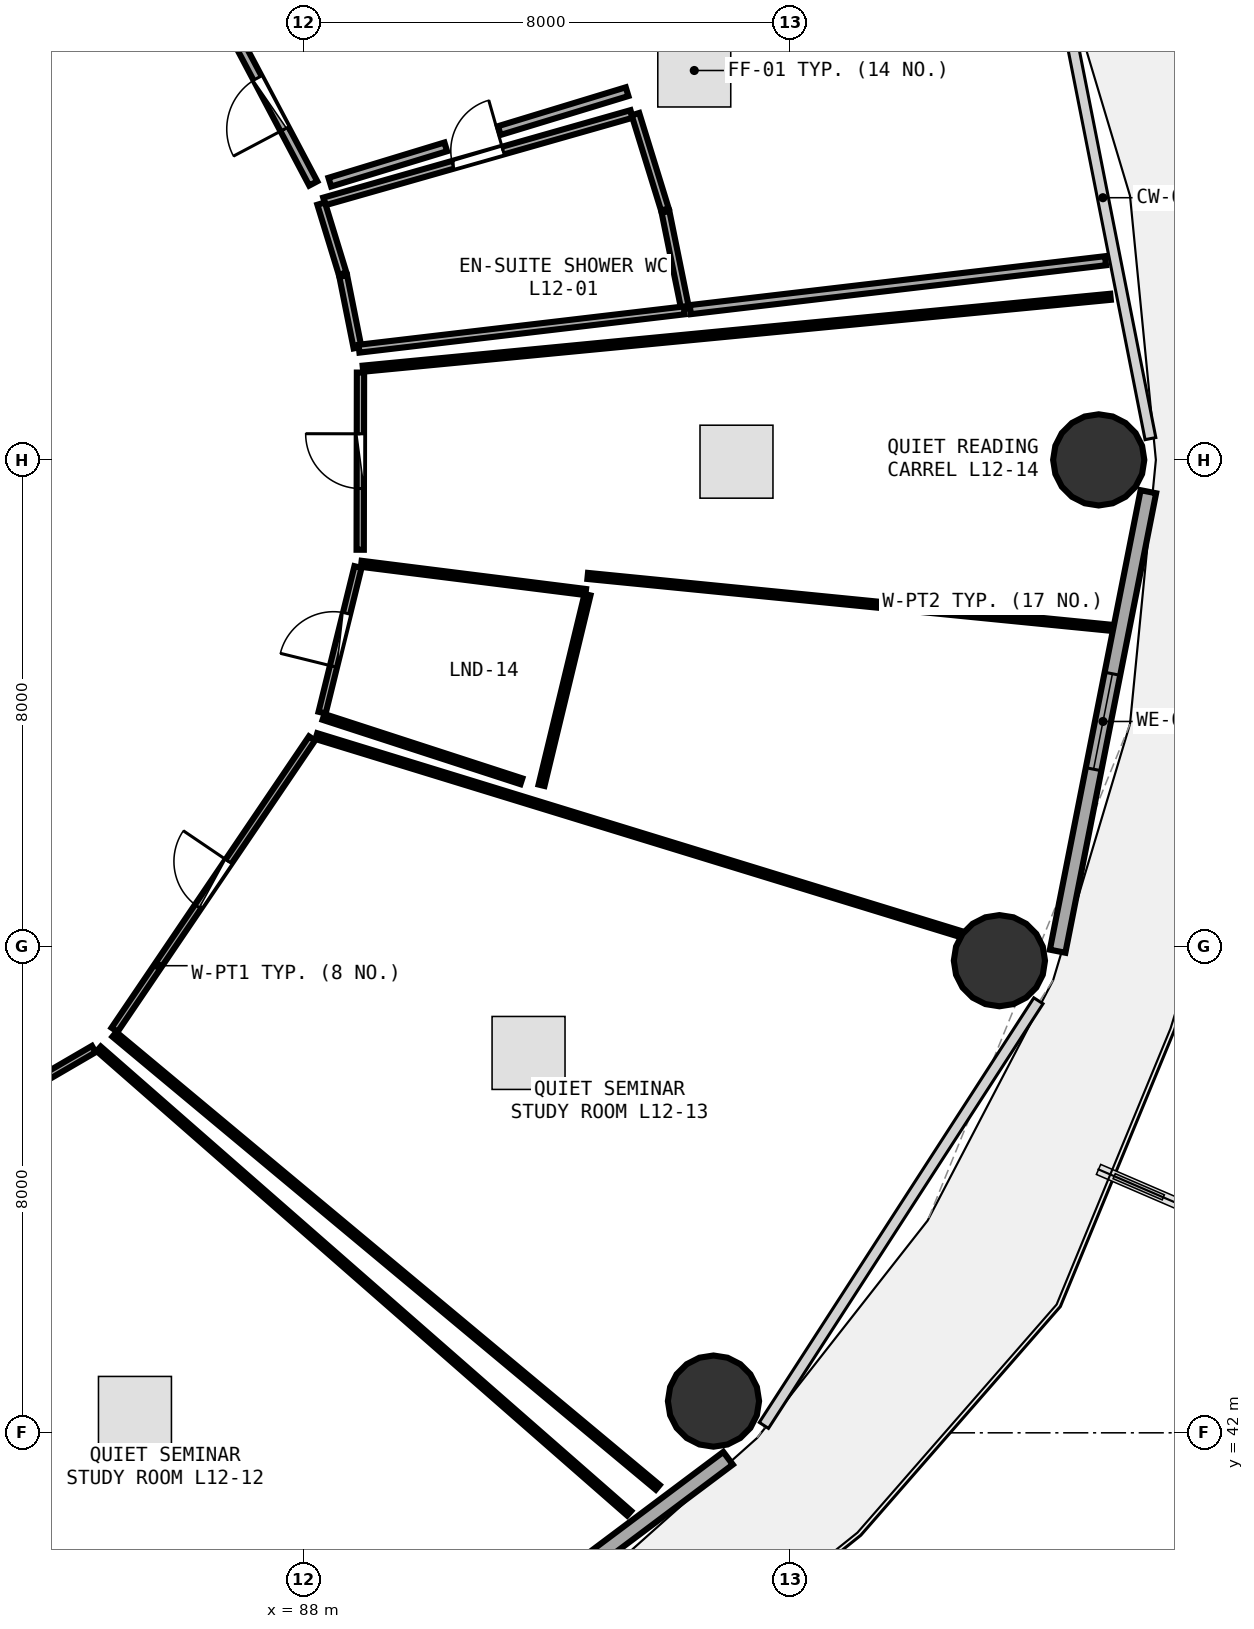
"""IFC4 building model, lengths in metres.
Left out: names, types, materials, properties, quantities, classifications, styles, units other than length and angle.
Written with IfcOpenShell. Run it as: python <this file> out.ifc"""

import sys

from ifc_helpers import new_model, si_unit, direction, frame, frame_2d, origin, origin_2d, place, context, subcontext, project, spatial, rectangle, circle, extrude, element, fill, save


model = new_model("IFC4")
c1 = context("Model", 3, precision=1e-05, world=origin(), true_north=direction((0.0, 1.0)))
c2 = subcontext(c1, "Body", "Model", "MODEL_VIEW")
j1 = project(units=[si_unit("LENGTHUNIT", "METRE"), si_unit("PLANEANGLEUNIT", "RADIAN")], contexts=[c1])
p1 = place(None, origin())
s1 = spatial("IfcSite", under=j1, at=p1, CompositionType="ELEMENT")
p2 = place(p1, origin())
s2 = spatial("IfcBuilding", under=s1, at=p2, CompositionType="ELEMENT")
p3 = place(p2, frame((0.0, 0.0, 48.75)))
s3 = spatial("IfcBuildingStorey", under=s2, at=p3, CompositionType="ELEMENT", Elevation=48.75)
for number, where, z_axis, x_axis in (
    (1, (101.08, 58.0, 0.0), (0.0, 0.0, 1.0), (1.0, 0.0, 0.0)),
    (2, (94.744, 42.522, 0.0), (0.0, 0.0, 1.0), (1.0, 0.0, 0.0)),
    (3, (99.447, 49.764, 0.0), (0.0, 0.0, 1.0), (1.0, 0.0, 0.0)),
):
    element("IfcColumn", number, at=place(p3, frame(where, z_axis=z_axis, x_axis=x_axis)), inside=s3, PredefinedType="COLUMN", context=c2, shape_type="SweptSolid", body=[
        extrude(circle(Radius=0.75, at=origin_2d()), origin(), (0.0, 0.0, 1.0), 3.75),
    ])
p4 = place(p3, frame((88.349, 36.611, 0.0), z_axis=(0.0, 0.0, 1.0), x_axis=(0.80030733173, 0.599590005569, 0.0)))
e4 = element("IfcWall", 4, at=p4, inside=s3, PredefinedType="SOLIDWALL", context=c2, shape_type="SweptSolid", body=[
    extrude(rectangle(XDim=8.291, YDim=0.26, at=frame_2d((4.145, 0.0))), origin(), (0.0, 0.0, 1.0), 3.475),
])
p5 = place(p4, frame((3.345, 0.0, 0.85)))
e5 = element("IfcOpeningElement", 5, at=p5, cuts=e4, PredefinedType="OPENING", context=c2, shape_type="SweptSolid", body=[
    extrude(rectangle(XDim=1.6, YDim=1.45, at=frame_2d((0.8, 0.725))), frame((0.0, 0.14, 0.0), z_axis=(0.0, -1.0, 0.0), x_axis=(1.0, 0.0, 0.0)), (0.0, 0.0, 1.0), 0.28),
])
p6 = place(p3, frame((100.404, 49.92, 0.0), z_axis=(0.0, 0.0, 1.0), x_axis=(0.193726159581, 0.98105564322, 0.0)))
e6 = element("IfcWall", 6, at=p6, inside=s3, PredefinedType="SOLIDWALL", context=c2, shape_type="SweptSolid", body=[
    extrude(rectangle(XDim=7.703, YDim=0.26, at=frame_2d((3.851, 0.0))), origin(), (0.0, 0.0, 1.0), 3.475),
])
p7 = place(p6, frame((3.051, 0.0, 0.85)))
e7 = element("IfcOpeningElement", 7, at=p7, cuts=e6, PredefinedType="OPENING", context=c2, shape_type="SweptSolid", body=[
    extrude(rectangle(XDim=1.6, YDim=1.45, at=frame_2d((0.8, 0.725))), frame((0.0, 0.14, 0.0), z_axis=(0.0, -1.0, 0.0), x_axis=(1.0, 0.0, 0.0)), (0.0, 0.0, 1.0), 0.28),
])
p8 = place(p3, frame((88.344, 62.25, 0.0), z_axis=(0.0, 0.0, 1.0), x_axis=(0.961805744602, 0.273732916636, 0.0)))
e8 = element("IfcWall", 8, at=p8, inside=s3, PredefinedType="PLUMBINGWALL", context=c2, shape_type="SweptSolid", body=[
    extrude(rectangle(XDim=5.254, YDim=0.13, at=frame_2d((2.627, 0.0))), origin(), (0.0, 0.0, 1.0), 3.175),
])
p9 = place(p8, frame((2.197, 0.0, 0.0)))
e9 = element("IfcOpeningElement", 9, at=p9, cuts=e8, PredefinedType="OPENING", context=c2, shape_type="SweptSolid", body=[
    extrude(rectangle(XDim=0.86, YDim=2.05, at=frame_2d((0.43, 1.025))), frame((0.0, 0.075, 0.0), z_axis=(0.0, -1.0, 0.0), x_axis=(1.0, 0.0, 0.0)), (0.0, 0.0, 1.0), 0.15),
])
p10 = place(p3, frame((88.162, 62.546, 0.0), z_axis=(0.0, 0.0, 1.0), x_axis=(-0.467566881753, 0.883957697567, 0.0)))
e10 = element("IfcWall", 10, at=p10, inside=s3, PredefinedType="PARTITIONING", context=c2, shape_type="SweptSolid", body=[
    extrude(rectangle(XDim=2.972, YDim=0.15, at=frame_2d((1.486, 0.0))), origin(), (0.0, 0.0, 1.0), 2.875),
])
p11 = place(p10, frame((1.011, 0.0, 0.0)))
e11 = element("IfcOpeningElement", 11, at=p11, cuts=e10, PredefinedType="OPENING", context=c2, shape_type="SweptSolid", body=[
    extrude(rectangle(XDim=0.95, YDim=2.08, at=frame_2d((0.475, 1.04))), frame((0.0, 0.085, 0.0), z_axis=(0.0, -1.0, 0.0), x_axis=(1.0, 0.0, 0.0)), (0.0, 0.0, 1.0), 0.17),
])
p12 = place(p3, frame((79.33, 45.268, 0.0), z_axis=(0.0, 0.0, 1.0), x_axis=(0.864061520755, 0.503386221852, 0.0)))
e12 = element("IfcWall", 12, at=p12, inside=s3, PredefinedType="PARTITIONING", context=c2, shape_type="SweptSolid", body=[
    extrude(rectangle(XDim=6.044, YDim=0.12, at=frame_2d((3.022, 0.0))), origin(), (0.0, 0.0, 1.0), 2.875),
])
p13 = place(p12, frame((2.572, 0.0, 0.0)))
e13 = element("IfcOpeningElement", 13, at=p13, cuts=e12, PredefinedType="OPENING", context=c2, shape_type="SweptSolid", body=[
    extrude(rectangle(XDim=0.9, YDim=2.08, at=frame_2d((0.45, 1.04))), frame((0.0, 0.07, 0.0), z_axis=(0.0, -1.0, 0.0), x_axis=(1.0, 0.0, 0.0)), (0.0, 0.0, 1.0), 0.14),
])
p14 = place(p3, frame((84.895, 48.628, 0.0), z_axis=(0.0, 0.0, 1.0), x_axis=(0.560933949984, 0.827860558159, 0.0)))
e14 = element("IfcWall", 14, at=p14, inside=s3, PredefinedType="PARTITIONING", context=c2, shape_type="SweptSolid", body=[
    extrude(rectangle(XDim=5.788, YDim=0.12, at=frame_2d((2.894, 0.0))), origin(), (0.0, 0.0, 1.0), 2.875),
])
p15 = place(p14, frame((2.444, 0.0, 0.0)))
e15 = element("IfcOpeningElement", 15, at=p15, cuts=e14, PredefinedType="OPENING", context=c2, shape_type="SweptSolid", body=[
    extrude(rectangle(XDim=0.9, YDim=2.08, at=frame_2d((0.45, 1.04))), frame((0.0, 0.07, 0.0), z_axis=(0.0, -1.0, 0.0), x_axis=(1.0, 0.0, 0.0)), (0.0, 0.0, 1.0), 0.14),
])
p16 = place(p3, frame((88.307, 53.843, 0.0), z_axis=(0.0, 0.0, 1.0), x_axis=(0.239366536705, 0.970929277088, 0.0)))
e16 = element("IfcWall", 16, at=p16, inside=s3, PredefinedType="PARTITIONING", context=c2, shape_type="SweptSolid", body=[
    extrude(rectangle(XDim=2.466, YDim=0.12, at=frame_2d((1.233, 0.0))), origin(), (0.0, 0.0, 1.0), 3.48),
])
p17 = place(p16, frame((0.783, 0.0, 0.0)))
e17 = element("IfcOpeningElement", 17, at=p17, cuts=e16, PredefinedType="OPENING", context=c2, shape_type="SweptSolid", body=[
    extrude(rectangle(XDim=0.9, YDim=2.08, at=frame_2d((0.45, 1.04))), frame((0.0, 0.07, 0.0), z_axis=(0.0, -1.0, 0.0), x_axis=(1.0, 0.0, 0.0)), (0.0, 0.0, 1.0), 0.14),
])
p18 = place(p3, frame((88.934, 56.522, 0.0), z_axis=(0.0, 0.0, 1.0), x_axis=(0.001675600865, 0.99999859618, 0.0)))
e18 = element("IfcWall", 18, at=p18, inside=s3, PredefinedType="PARTITIONING", context=c2, shape_type="SweptSolid", body=[
    extrude(rectangle(XDim=2.914, YDim=0.12, at=frame_2d((1.457, 0.0))), origin(), (0.0, 0.0, 1.0), 2.875),
])
p19 = place(p18, frame((1.007, 0.0, 0.0)))
e19 = element("IfcOpeningElement", 19, at=p19, cuts=e18, PredefinedType="OPENING", context=c2, shape_type="SweptSolid", body=[
    extrude(rectangle(XDim=0.9, YDim=2.08, at=frame_2d((0.45, 1.04))), frame((0.0, 0.07, 0.0), z_axis=(0.0, -1.0, 0.0), x_axis=(1.0, 0.0, 0.0)), (0.0, 0.0, 1.0), 0.14),
])
p20 = place(p3, frame((88.89, 59.846, 0.0), z_axis=(0.0, 0.0, 1.0), x_axis=(-0.195959765133, 0.980611936726, 0.0)))
e20 = element("IfcWall", 20, at=p20, inside=s3, PredefinedType="PLUMBINGWALL", context=c2, shape_type="SweptSolid", body=[
    extrude(rectangle(XDim=1.201, YDim=0.13, at=frame_2d((0.601, 0.0))), origin(), (0.0, 0.0, 1.0), 3.48),
])
p21 = place(p3, frame((88.645, 61.062, 0.0), z_axis=(0.0, 0.0, 1.0), x_axis=(-0.292804953119, 0.956172191307, 0.0)))
e21 = element("IfcWall", 21, at=p21, inside=s3, PredefinedType="PLUMBINGWALL", context=c2, shape_type="SweptSolid", body=[
    extrude(rectangle(XDim=1.206, YDim=0.13, at=frame_2d((0.603, 0.0))), origin(), (0.0, 0.0, 1.0), 3.48),
])
p22 = place(p3, frame((93.461, 63.686, 0.0), z_axis=(0.0, 0.0, 1.0), x_axis=(0.295079059694, -0.955472840289, 0.0)))
e22 = element("IfcWall", 22, at=p22, inside=s3, PredefinedType="PLUMBINGWALL", context=c2, shape_type="SweptSolid", body=[
    extrude(rectangle(XDim=1.641, YDim=0.13, at=frame_2d((0.82, 0.0))), origin(), (0.0, 0.0, 1.0), 3.48),
])
p23 = place(p3, frame((93.955, 62.079, 0.0), z_axis=(0.0, 0.0, 1.0), x_axis=(0.198619685617, -0.980076640108, 0.0)))
e23 = element("IfcWall", 23, at=p23, inside=s3, PredefinedType="PLUMBINGWALL", context=c2, shape_type="SweptSolid", body=[
    extrude(rectangle(XDim=1.631, YDim=0.13, at=frame_2d((0.815, 0.0))), origin(), (0.0, 0.0, 1.0), 3.48),
])
p24 = place(p3, frame((94.263, 60.459, 0.0), z_axis=(0.0, 0.0, 1.0), x_axis=(-0.993128310231, -0.117030591804, 0.0)))
e24 = element("IfcWall", 24, at=p24, inside=s3, PredefinedType="PLUMBINGWALL", context=c2, shape_type="SweptSolid", body=[
    extrude(rectangle(XDim=5.386, YDim=0.13, at=frame_2d((2.693, 0.0))), origin(), (0.0, 0.0, 1.0), 3.175),
])
p25 = place(p3, frame((101.192, 61.275, 0.0), z_axis=(0.0, 0.0, 1.0), x_axis=(-0.993130233211, -0.117014272133, 0.0)))
e25 = element("IfcWall", 25, at=p25, inside=s3, PredefinedType="PARTITIONING", context=c2, shape_type="SweptSolid", body=[
    extrude(rectangle(XDim=6.877, YDim=0.15, at=frame_2d((3.438, 0.0))), origin(), (0.0, 0.0, 1.0), 2.875),
])
p26 = place(p3, frame((93.324, 64.055, 0.0), z_axis=(0.0, 0.0, 1.0), x_axis=(-0.956656385618, -0.291219092533, 0.0)))
e26 = element("IfcWall", 26, at=p26, inside=s3, PredefinedType="PARTITIONING", context=c2, shape_type="SweptSolid", body=[
    extrude(rectangle(XDim=2.197, YDim=0.15, at=frame_2d((1.099, 0.0))), origin(), (0.0, 0.0, 1.0), 3.175),
])
p27 = place(p3, frame((90.341, 63.148, 0.0), z_axis=(0.0, 0.0, 1.0), x_axis=(-0.956672396934, -0.291166490078, 0.0)))
e27 = element("IfcWall", 27, at=p27, inside=s3, PredefinedType="PARTITIONING", context=c2, shape_type="SweptSolid", body=[
    extrude(rectangle(XDim=1.993, YDim=0.15, at=frame_2d((0.997, 0.0))), origin(), (0.0, 0.0, 1.0), 3.235),
])
p28 = place(p3, frame((84.634, 48.315, 0.0), z_axis=(0.0, 0.0, 1.0), x_axis=(0.752403187404, -0.658702849231, 0.0)))
e28 = element("IfcWall", 28, at=p28, inside=s3, PredefinedType="PARTITIONING", context=c2, shape_type="SweptSolid", body=[
    extrude(rectangle(XDim=11.595, YDim=0.1, at=frame_2d((5.797, 0.0))), origin(), (0.0, 0.0, 1.0), 2.875),
])
p29 = place(p3, frame((88.213, 53.457, 0.0), z_axis=(0.0, 0.0, 1.0), x_axis=(0.955941269752, -0.29355798198, 0.0)))
e29 = element("IfcWall", 29, at=p29, inside=s3, PredefinedType="PARTITIONING", context=c2, shape_type="SweptSolid", body=[
    extrude(rectangle(XDim=11.083, YDim=0.1, at=frame_2d((5.542, 0.0))), origin(), (0.0, 0.0, 1.0), 3.175),
])
p30 = place(p3, frame((93.827, 41.104, 0.0), z_axis=(0.0, 0.0, 1.0), x_axis=(-0.768116338219, 0.640310308336, 0.0)))
e30 = element("IfcWall", 30, at=p30, inside=s3, PredefinedType="PARTITIONING", context=c2, shape_type="SweptSolid", body=[
    extrude(rectangle(XDim=11.633, YDim=0.1, at=frame_2d((5.817, 0.0))), origin(), (0.0, 0.0, 1.0), 2.875),
])
p31 = place(p3, frame((88.952, 56.291, 0.0), z_axis=(0.0, 0.0, 1.0), x_axis=(0.992185717147, -0.124769798789, 0.0)))
e31 = element("IfcWall", 31, at=p31, inside=s3, PredefinedType="PARTITIONING", context=c2, shape_type="SweptSolid", body=[
    extrude(rectangle(XDim=3.72, YDim=0.1, at=frame_2d((1.86, 0.0))), origin(), (0.0, 0.0, 1.0), 3.235),
])
p32 = place(p3, frame((92.673, 55.783, 0.0), z_axis=(0.0, 0.0, 1.0), x_axis=(-0.234509762348, -0.97211376462, 0.0)))
e32 = element("IfcWall", 32, at=p32, inside=s3, PredefinedType="PARTITIONING", context=c2, shape_type="SweptSolid", body=[
    extrude(rectangle(XDim=3.224, YDim=0.1, at=frame_2d((1.612, 0.0))), origin(), (0.0, 0.0, 1.0), 3.48),
])
p33 = place(p3, frame((91.585, 52.715, 0.0), z_axis=(0.0, 0.0, 1.0), x_axis=(-0.950990540972, 0.309219971834, 0.0)))
e33 = element("IfcWall", 33, at=p33, inside=s3, PredefinedType="PARTITIONING", context=c2, shape_type="SweptSolid", body=[
    extrude(rectangle(XDim=3.422, YDim=0.1, at=frame_2d((1.711, 0.0))), origin(), (0.0, 0.0, 1.0), 3.235),
])
p34 = place(p3, frame((88.979, 59.5, 0.0), z_axis=(0.0, 0.0, 1.0), x_axis=(0.995408087514, 0.095722198638, 0.0)))
e34 = element("IfcWall", 34, at=p34, inside=s3, PredefinedType="PARTITIONING", context=c2, shape_type="SweptSolid", body=[
    extrude(rectangle(XDim=12.352, YDim=0.1, at=frame_2d((6.176, 0.0))), origin(), (0.0, 0.0, 1.0), 2.875),
])
p35 = place(p3, frame((101.264, 55.241, 0.0), z_axis=(0.0, 0.0, 1.0), x_axis=(-0.995131682946, 0.098554216532, 0.0)))
e35 = element("IfcWall", 35, at=p35, inside=s3, PredefinedType="PARTITIONING", context=c2, shape_type="SweptSolid", body=[
    extrude(rectangle(XDim=8.631, YDim=0.1, at=frame_2d((4.315, 0.0))), origin(), (0.0, 0.0, 1.0), 2.875),
])
p36 = place(p7, origin())
e36 = element("IfcWindow", 36, at=p36, inside=s3, PartitioningType="SINGLE_PANEL", PredefinedType="WINDOW", context=c2, shape_type="SweptSolid", body=[
    extrude(rectangle(XDim=1.6, YDim=1.45, at=frame_2d((0.8, 0.725))), frame((0.0, 0.03, 0.0), z_axis=(0.0, -1.0, 0.0), x_axis=(1.0, 0.0, 0.0)), (0.0, 0.0, 1.0), 0.06),
])
fill(e7, e36)
p37 = place(p9, origin())
e37 = element("IfcDoor", 37, at=p37, inside=s3, OperationType="SINGLE_SWING_RIGHT", PredefinedType="DOOR", context=c2, shape_type="SweptSolid", body=[
    extrude(rectangle(XDim=0.86, YDim=2.05, at=frame_2d((0.43, 1.025))), frame((0.0, 0.025, 0.0), z_axis=(0.0, -1.0, 0.0), x_axis=(1.0, 0.0, 0.0)), (0.0, 0.0, 1.0), 0.05),
])
fill(e9, e37)
p38 = place(p11, origin())
e38 = element("IfcDoor", 38, at=p38, inside=s3, OperationType="SINGLE_SWING_LEFT", PredefinedType="DOOR", context=c2, shape_type="SweptSolid", body=[
    extrude(rectangle(XDim=0.95, YDim=2.08, at=frame_2d((0.475, 1.04))), frame((0.0, 0.025, 0.0), z_axis=(0.0, -1.0, 0.0), x_axis=(1.0, 0.0, 0.0)), (0.0, 0.0, 1.0), 0.05),
])
fill(e11, e38)
p39 = place(p15, origin())
e39 = element("IfcDoor", 39, at=p39, inside=s3, OperationType="SINGLE_SWING_RIGHT", PredefinedType="DOOR", context=c2, shape_type="SweptSolid", body=[
    extrude(rectangle(XDim=0.9, YDim=2.08, at=frame_2d((0.45, 1.04))), frame((0.0, 0.025, 0.0), z_axis=(0.0, -1.0, 0.0), x_axis=(1.0, 0.0, 0.0)), (0.0, 0.0, 1.0), 0.05),
])
fill(e15, e39)
p40 = place(p17, origin())
e40 = element("IfcDoor", 40, at=p40, inside=s3, OperationType="SINGLE_SWING_LEFT", PredefinedType="DOOR", context=c2, shape_type="SweptSolid", body=[
    extrude(rectangle(XDim=0.9, YDim=2.08, at=frame_2d((0.45, 1.04))), frame((0.0, 0.025, 0.0), z_axis=(0.0, -1.0, 0.0), x_axis=(1.0, 0.0, 0.0)), (0.0, 0.0, 1.0), 0.05),
])
fill(e17, e40)
p41 = place(p19, origin())
e41 = element("IfcDoor", 41, at=p41, inside=s3, OperationType="SINGLE_SWING_RIGHT", PredefinedType="DOOR", context=c2, shape_type="SweptSolid", body=[
    extrude(rectangle(XDim=0.9, YDim=2.08, at=frame_2d((0.45, 1.04))), frame((0.0, 0.025, 0.0), z_axis=(0.0, -1.0, 0.0), x_axis=(1.0, 0.0, 0.0)), (0.0, 0.0, 1.0), 0.05),
])
fill(e19, e41)
save(model, sys.argv[1])
